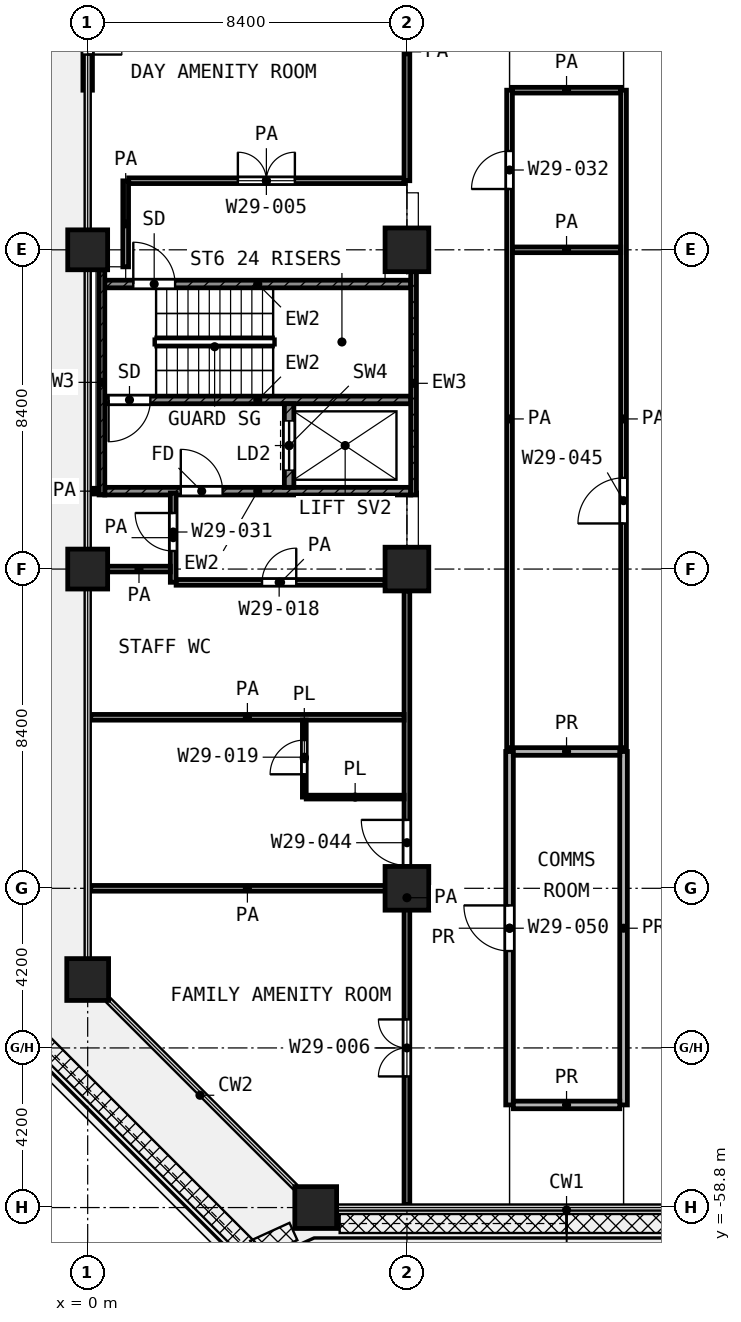
"""IFC4 building model, lengths in metres.
Left out: names, types, materials, properties, quantities, classifications, styles, units other than length and angle.
Written with IfcOpenShell. Run it as: python <this file> out.ifc"""

import sys

from ifc_helpers import new_model, si_unit, direction, frame, frame_2d, origin, origin_2d, place, context, subcontext, project, spatial, rectangle, extrude, element, fill, save


model = new_model("IFC4")
c1 = context("Model", 3, precision=1e-05, world=origin(), true_north=direction((0.0, 1.0)))
c2 = subcontext(c1, "Body", "Model", "MODEL_VIEW")
j1 = project(units=[si_unit("LENGTHUNIT", "METRE"), si_unit("PLANEANGLEUNIT", "RADIAN")], contexts=[c1])
p1 = place(None, origin())
s1 = spatial("IfcSite", under=j1, at=p1, CompositionType="ELEMENT")
p2 = place(p1, origin())
s2 = spatial("IfcBuilding", under=s1, at=p2, CompositionType="ELEMENT")
p3 = place(p2, frame((0.0, 0.0, 149.2)))
s3 = spatial("IfcBuildingStorey", under=s2, at=p3, CompositionType="ELEMENT", Elevation=149.2)
p4 = place(p3, frame((0.0, -33.6, 0.0), z_axis=(0.0, 0.0, 1.0), x_axis=(1.0, 0.0, 0.0)))
e1 = element("IfcColumn", 1, at=p4, inside=s3, PredefinedType="COLUMN", context=c2, shape_type="SweptSolid", body=[
    extrude(rectangle(XDim=1.05, YDim=1.05, at=origin_2d()), origin(), (0.0, 0.0, 1.0), 4.2),
])
p5 = place(p3, frame((8.4, -33.6, 0.0), z_axis=(0.0, 0.0, 1.0), x_axis=(1.0, 0.0, 0.0)))
e2 = element("IfcColumn", 2, at=p5, inside=s3, PredefinedType="COLUMN", context=c2, shape_type="SweptSolid", body=[
    extrude(rectangle(XDim=1.15, YDim=1.15, at=origin_2d()), origin(), (0.0, 0.0, 1.0), 4.2),
])
p6 = place(p3, frame((0.0, -42.0, 0.0), z_axis=(0.0, 0.0, 1.0), x_axis=(1.0, 0.0, 0.0)))
e3 = element("IfcColumn", 3, at=p6, inside=s3, PredefinedType="COLUMN", context=c2, shape_type="SweptSolid", body=[
    extrude(rectangle(XDim=1.05, YDim=1.05, at=origin_2d()), origin(), (0.0, 0.0, 1.0), 4.2),
])
for number, where, z_axis, x_axis in (
    (4, (8.4, -42.0, 0.0), (0.0, 0.0, 1.0), (1.0, 0.0, 0.0)),
    (5, (8.4, -50.4, 0.0), (0.0, 0.0, 1.0), (1.0, 0.0, 0.0)),
):
    element("IfcColumn", number, at=place(p3, frame(where, z_axis=z_axis, x_axis=x_axis)), inside=s3, PredefinedType="COLUMN", context=c2, shape_type="SweptSolid", body=[
        extrude(rectangle(XDim=1.15, YDim=1.15, at=origin_2d()), origin(), (0.0, 0.0, 1.0), 4.2),
    ])
for number, where, z_axis, x_axis in (
    (6, (0.0, -52.8, 0.0), (0.0, 0.0, 1.0), (1.0, 0.0, 0.0)),
    (7, (6.0, -58.8, 0.0), (0.0, 0.0, 1.0), (1.0, 0.0, 0.0)),
):
    element("IfcColumn", number, at=place(p3, frame(where, z_axis=z_axis, x_axis=x_axis)), inside=s3, PredefinedType="COLUMN", context=c2, shape_type="SweptSolid", body=[
        extrude(rectangle(XDim=1.1, YDim=1.1, at=origin_2d()), origin(), (0.0, 0.0, 1.0), 4.2),
    ])
p7 = place(p3, frame((0.0, -25.725, 0.0), z_axis=(0.0, 0.0, 1.0), x_axis=(0.0, -1.0, 0.0)))
e8 = element("IfcWall", 8, at=p7, inside=s3, PredefinedType="SOLIDWALL", context=c2, shape_type="SweptSolid", body=[
    extrude(rectangle(XDim=3.675, YDim=0.25, at=frame_2d((1.837, 0.0))), origin(), (0.0, 0.0, 1.0), 3.58),
])
p8 = place(p7, frame((0.938, 0.0, 0.0)))
e9 = element("IfcOpeningElement", 9, at=p8, cuts=e8, PredefinedType="OPENING", context=c2, shape_type="SweptSolid", body=[
    extrude(rectangle(XDim=1.8, YDim=2.1, at=frame_2d((0.9, 1.05))), frame((0.0, 0.135, 0.0), z_axis=(0.0, -1.0, 0.0), x_axis=(1.0, 0.0, 0.0)), (0.0, 0.0, 1.0), 0.27),
])
p9 = place(p3, frame((0.375, -40.05, 0.0), z_axis=(0.0, 0.0, 1.0), x_axis=(0.0, 1.0, 0.0)))
e10 = element("IfcWall", 10, at=p9, inside=s3, PredefinedType="SHEAR", context=c2, shape_type="SweptSolid", body=[
    extrude(rectangle(XDim=5.925, YDim=0.15, at=frame_2d((2.962, 0.0))), origin(), (0.0, 0.0, 1.0), 3.7),
])
p10 = place(p3, frame((8.575, -40.05, 0.0), z_axis=(0.0, 0.0, 1.0), x_axis=(0.0, 1.0, 0.0)))
e11 = element("IfcWall", 11, at=p10, inside=s3, PredefinedType="SHEAR", context=c2, shape_type="SweptSolid", body=[
    extrude(rectangle(XDim=5.875, YDim=0.15, at=frame_2d((2.938, 0.0))), origin(), (0.0, 0.0, 1.0), 3.7),
])
p11 = place(p3, frame((0.45, -34.5, 0.0), z_axis=(0.0, 0.0, 1.0), x_axis=(1.0, 0.0, 0.0)))
e12 = element("IfcWall", 12, at=p11, inside=s3, PredefinedType="SHEAR", context=c2, shape_type="SweptSolid", body=[
    extrude(rectangle(XDim=8.05, YDim=0.2, at=frame_2d((4.025, 0.0))), origin(), (0.0, 0.0, 1.0), 3.7),
])
p12 = place(p11, frame((0.75, 0.0, 0.0)))
e13 = element("IfcOpeningElement", 13, at=p12, cuts=e12, PredefinedType="OPENING", context=c2, shape_type="SweptSolid", body=[
    extrude(rectangle(XDim=1.1, YDim=2.1, at=frame_2d((0.55, 1.05))), frame((0.0, 0.11, 0.0), z_axis=(0.0, -1.0, 0.0), x_axis=(1.0, 0.0, 0.0)), (0.0, 0.0, 1.0), 0.22),
])
p13 = place(p3, frame((0.45, -37.55, 0.0), z_axis=(0.0, 0.0, 1.0), x_axis=(1.0, 0.0, 0.0)))
e14 = element("IfcWall", 14, at=p13, inside=s3, PredefinedType="SHEAR", context=c2, shape_type="SweptSolid", body=[
    extrude(rectangle(XDim=8.05, YDim=0.2, at=frame_2d((4.025, 0.0))), origin(), (0.0, 0.0, 1.0), 3.7),
])
p14 = place(p13, frame((0.1, 0.0, 0.0)))
e15 = element("IfcOpeningElement", 15, at=p14, cuts=e14, PredefinedType="OPENING", context=c2, shape_type="SweptSolid", body=[
    extrude(rectangle(XDim=1.1, YDim=2.1, at=frame_2d((0.55, 1.05))), frame((0.0, 0.11, 0.0), z_axis=(0.0, -1.0, 0.0), x_axis=(1.0, 0.0, 0.0)), (0.0, 0.0, 1.0), 0.22),
])
p15 = place(p3, frame((0.45, -39.95, 0.0), z_axis=(0.0, 0.0, 1.0), x_axis=(1.0, 0.0, 0.0)))
e16 = element("IfcWall", 16, at=p15, inside=s3, PredefinedType="SHEAR", context=c2, shape_type="SweptSolid", body=[
    extrude(rectangle(XDim=8.05, YDim=0.2, at=frame_2d((4.025, 0.0))), origin(), (0.0, 0.0, 1.0), 3.7),
])
p16 = place(p15, frame((2.0, 0.0, 0.0)))
e17 = element("IfcOpeningElement", 17, at=p16, cuts=e16, PredefinedType="OPENING", context=c2, shape_type="SweptSolid", body=[
    extrude(rectangle(XDim=1.1, YDim=2.1, at=frame_2d((0.55, 1.05))), frame((0.0, 0.11, 0.0), z_axis=(0.0, -1.0, 0.0), x_axis=(1.0, 0.0, 0.0)), (0.0, 0.0, 1.0), 0.22),
])
p17 = place(p3, frame((5.3, -39.85, 0.0), z_axis=(0.0, 0.0, 1.0), x_axis=(0.0, 1.0, 0.0)))
e18 = element("IfcWall", 18, at=p17, inside=s3, PredefinedType="SHEAR", context=c2, shape_type="SweptSolid", body=[
    extrude(rectangle(XDim=2.2, YDim=0.25, at=frame_2d((1.1, 0.0))), origin(), (0.0, 0.0, 1.0), 3.7),
])
p18 = place(p17, frame((0.45, 0.0, 0.0)))
e19 = element("IfcOpeningElement", 19, at=p18, cuts=e18, PredefinedType="OPENING", context=c2, shape_type="SweptSolid", body=[
    extrude(rectangle(XDim=1.3, YDim=2.1, at=frame_2d((0.65, 1.05))), frame((0.0, 0.135, 0.0), z_axis=(0.0, -1.0, 0.0), x_axis=(1.0, 0.0, 0.0)), (0.0, 0.0, 1.0), 0.27),
])
p19 = place(p3, frame((5.75, -48.0, 0.0), z_axis=(0.0, 0.0, 1.0), x_axis=(1.0, 0.0, 0.0)))
e20 = element("IfcWall", 20, at=p19, inside=s3, PredefinedType="PARTITIONING", context=c2, shape_type="SweptSolid", body=[
    extrude(rectangle(XDim=2.575, YDim=0.1, at=frame_2d((1.288, 0.0))), origin(), (0.0, 0.0, 1.0), 3.7),
])
p20 = place(p3, frame((5.7, -48.0, 0.0), z_axis=(0.0, 0.0, 1.0), x_axis=(0.0, 1.0, 0.0)))
e21 = element("IfcWall", 21, at=p20, inside=s3, PredefinedType="PARTITIONING", context=c2, shape_type="SweptSolid", body=[
    extrude(rectangle(XDim=2.025, YDim=0.1, at=frame_2d((1.012, 0.0))), origin(), (0.0, 0.0, 1.0), 3.7),
])
p21 = place(p20, frame((0.6, 0.0, 0.0)))
e22 = element("IfcOpeningElement", 22, at=p21, cuts=e21, PredefinedType="OPENING", context=c2, shape_type="SweptSolid", body=[
    extrude(rectangle(XDim=0.9, YDim=2.1, at=frame_2d((0.45, 1.05))), frame((0.0, 0.06, 0.0), z_axis=(0.0, -1.0, 0.0), x_axis=(1.0, 0.0, 0.0)), (0.0, 0.0, 1.0), 0.12),
])
for number, where, z_axis, x_axis in (
    (23, (0.08, -50.4, 0.0), (0.0, 0.0, 1.0), (1.0, 0.0, 0.0)),
    (24, (0.08, -45.9, 0.0), (0.0, 0.0, 1.0), (1.0, 0.0, 0.0)),
):
    element("IfcWall", number, at=place(p3, frame(where, z_axis=z_axis, x_axis=x_axis)), inside=s3, PredefinedType="PARTITIONING", context=c2, shape_type="SweptSolid", body=[
        extrude(rectangle(XDim=8.245, YDim=0.15, at=frame_2d((4.123, 0.0))), origin(), (0.0, 0.0, 1.0), 3.7),
    ])
p22 = place(p3, frame((2.327, -42.35, 0.0), z_axis=(0.0, 0.0, 1.0), x_axis=(1.0, 0.0, 0.0)))
e25 = element("IfcWall", 25, at=p22, inside=s3, PredefinedType="PARTITIONING", context=c2, shape_type="SweptSolid", body=[
    extrude(rectangle(XDim=5.498, YDim=0.15, at=frame_2d((2.749, 0.0))), origin(), (0.0, 0.0, 1.0), 3.7),
])
p23 = place(p22, frame((2.261, 0.0, 0.0)))
e26 = element("IfcOpeningElement", 26, at=p23, cuts=e25, PredefinedType="OPENING", context=c2, shape_type="SweptSolid", body=[
    extrude(rectangle(XDim=0.9, YDim=2.1, at=frame_2d((0.45, 1.05))), frame((0.0, 0.085, 0.0), z_axis=(0.0, -1.0, 0.0), x_axis=(1.0, 0.0, 0.0)), (0.0, 0.0, 1.0), 0.17),
])
p24 = place(p3, frame((0.525, -42.0, 0.0), z_axis=(0.0, 0.0, 1.0), x_axis=(1.0, 0.0, 0.0)))
e27 = element("IfcWall", 27, at=p24, inside=s3, PredefinedType="PARTITIONING", context=c2, shape_type="SweptSolid", body=[
    extrude(rectangle(XDim=1.65, YDim=0.15, at=frame_2d((0.825, 0.0))), origin(), (0.0, 0.0, 1.0), 3.7),
])
p25 = place(p3, frame((0.08, -39.95, 0.0), z_axis=(0.0, 0.0, 1.0), x_axis=(1.0, 0.0, 0.0)))
e28 = element("IfcWall", 28, at=p25, inside=s3, PredefinedType="PARTITIONING", context=c2, shape_type="SweptSolid", body=[
    extrude(rectangle(XDim=0.19, YDim=0.15, at=frame_2d((0.095, 0.0))), origin(), (0.0, 0.0, 1.0), 3.7),
])
p26 = place(p3, frame((11.175, -33.6, 0.0), z_axis=(0.0, 0.0, 1.0), x_axis=(1.0, 0.0, 0.0)))
e29 = element("IfcWall", 29, at=p26, inside=s3, PredefinedType="PARTITIONING", context=c2, shape_type="SweptSolid", body=[
    extrude(rectangle(XDim=2.85, YDim=0.15, at=frame_2d((1.425, 0.0))), origin(), (0.0, 0.0, 1.0), 3.7),
])
p27 = place(p3, frame((1.079, -31.782, 0.0), z_axis=(0.0, 0.0, 1.0), x_axis=(1.0, 0.0, 0.0)))
e30 = element("IfcWall", 30, at=p27, inside=s3, PredefinedType="PARTITIONING", context=c2, shape_type="SweptSolid", body=[
    extrude(rectangle(XDim=7.246, YDim=0.15, at=frame_2d((3.623, 0.0))), origin(), (0.0, 0.0, 1.0), 3.7),
])
p28 = place(p27, frame((2.873, 0.0, 0.0)))
e31 = element("IfcOpeningElement", 31, at=p28, cuts=e30, PredefinedType="OPENING", context=c2, shape_type="SweptSolid", body=[
    extrude(rectangle(XDim=1.5, YDim=2.1, at=frame_2d((0.75, 1.05))), frame((0.0, 0.085, 0.0), z_axis=(0.0, -1.0, 0.0), x_axis=(1.0, 0.0, 0.0)), (0.0, 0.0, 1.0), 0.17),
])
p29 = place(p3, frame((11.175, -29.4, 0.0), z_axis=(0.0, 0.0, 1.0), x_axis=(1.0, 0.0, 0.0)))
e32 = element("IfcWall", 32, at=p29, inside=s3, PredefinedType="PARTITIONING", context=c2, shape_type="SweptSolid", body=[
    extrude(rectangle(XDim=2.85, YDim=0.15, at=frame_2d((1.425, 0.0))), origin(), (0.0, 0.0, 1.0), 3.7),
])
p30 = place(p3, frame((1.0, -34.048, 0.0), z_axis=(0.0, 0.0, 1.0), x_axis=(0.0, 1.0, 0.0)))
e33 = element("IfcWall", 33, at=p30, inside=s3, PredefinedType="PARTITIONING", context=c2, shape_type="SweptSolid", body=[
    extrude(rectangle(XDim=2.263, YDim=0.15, at=frame_2d((1.132, 0.0))), origin(), (0.0, 0.0, 1.0), 3.7),
])
p31 = place(p3, frame((2.25, -42.348, 0.0), z_axis=(0.0, 0.0, 1.0), x_axis=(0.0, 1.0, 0.0)))
e34 = element("IfcWall", 34, at=p31, inside=s3, PredefinedType="PARTITIONING", context=c2, shape_type="SweptSolid", body=[
    extrude(rectangle(XDim=2.348, YDim=0.15, at=frame_2d((1.174, 0.0))), origin(), (0.0, 0.0, 1.0), 3.7),
])
p32 = place(p31, frame((0.823, 0.0, 0.0)))
e35 = element("IfcOpeningElement", 35, at=p32, cuts=e34, PredefinedType="OPENING", context=c2, shape_type="SweptSolid", body=[
    extrude(rectangle(XDim=1.0, YDim=2.1, at=frame_2d((0.5, 1.05))), frame((0.0, 0.085, 0.0), z_axis=(0.0, -1.0, 0.0), x_axis=(1.0, 0.0, 0.0)), (0.0, 0.0, 1.0), 0.17),
])
p33 = place(p3, frame((8.4, -58.72, 0.0), z_axis=(0.0, 0.0, 1.0), x_axis=(0.0, 1.0, 0.0)))
e36 = element("IfcWall", 36, at=p33, inside=s3, PredefinedType="PARTITIONING", context=c2, shape_type="SweptSolid", body=[
    extrude(rectangle(XDim=16.145, YDim=0.15, at=frame_2d((8.073, 0.0))), origin(), (0.0, 0.0, 1.0), 3.7),
])
p34 = place(p33, frame((8.92, 0.0, 0.0)))
e37 = element("IfcOpeningElement", 37, at=p34, cuts=e36, PredefinedType="OPENING", context=c2, shape_type="SweptSolid", body=[
    extrude(rectangle(XDim=1.2, YDim=2.1, at=frame_2d((0.6, 1.05))), frame((0.0, 0.085, 0.0), z_axis=(0.0, -1.0, 0.0), x_axis=(1.0, 0.0, 0.0)), (0.0, 0.0, 1.0), 0.17),
])
p35 = place(p33, frame((3.37, 0.0, 0.0)))
e38 = element("IfcOpeningElement", 38, at=p35, cuts=e36, PredefinedType="OPENING", context=c2, shape_type="SweptSolid", body=[
    extrude(rectangle(XDim=1.5, YDim=2.1, at=frame_2d((0.75, 1.05))), frame((0.0, 0.085, 0.0), z_axis=(0.0, -1.0, 0.0), x_axis=(1.0, 0.0, 0.0)), (0.0, 0.0, 1.0), 0.17),
])
p36 = place(p3, frame((8.4, -31.782, 0.0), z_axis=(0.0, 0.0, 1.0), x_axis=(0.0, 1.0, 0.0)))
e39 = element("IfcWall", 39, at=p36, inside=s3, PredefinedType="PARTITIONING", context=c2, shape_type="SweptSolid", body=[
    extrude(rectangle(XDim=6.782, YDim=0.15, at=frame_2d((3.391, 0.0))), origin(), (0.0, 0.0, 1.0), 3.7),
])
p37 = place(p3, frame((11.1, -46.7, 0.0), z_axis=(0.0, 0.0, 1.0), x_axis=(0.0, 1.0, 0.0)))
e40 = element("IfcWall", 40, at=p37, inside=s3, PredefinedType="PARTITIONING", context=c2, shape_type="SweptSolid", body=[
    extrude(rectangle(XDim=17.3, YDim=0.15, at=frame_2d((8.65, 0.0))), origin(), (0.0, 0.0, 1.0), 3.7),
])
p38 = place(p37, frame((14.7, 0.0, 0.0)))
e41 = element("IfcOpeningElement", 41, at=p38, cuts=e40, PredefinedType="OPENING", context=c2, shape_type="SweptSolid", body=[
    extrude(rectangle(XDim=1.0, YDim=2.1, at=frame_2d((0.5, 1.05))), frame((0.0, 0.085, 0.0), z_axis=(0.0, -1.0, 0.0), x_axis=(1.0, 0.0, 0.0)), (0.0, 0.0, 1.0), 0.17),
])
p39 = place(p3, frame((14.1, -46.7, 0.0), z_axis=(0.0, 0.0, 1.0), x_axis=(0.0, 1.0, 0.0)))
e42 = element("IfcWall", 42, at=p39, inside=s3, PredefinedType="PARTITIONING", context=c2, shape_type="SweptSolid", body=[
    extrude(rectangle(XDim=17.3, YDim=0.15, at=frame_2d((8.65, 0.0))), origin(), (0.0, 0.0, 1.0), 3.7),
])
p40 = place(p39, frame((5.9, 0.0, 0.0)))
e43 = element("IfcOpeningElement", 43, at=p40, cuts=e42, PredefinedType="OPENING", context=c2, shape_type="SweptSolid", body=[
    extrude(rectangle(XDim=1.2, YDim=2.1, at=frame_2d((0.6, 1.05))), frame((0.0, 0.085, 0.0), z_axis=(0.0, -1.0, 0.0), x_axis=(1.0, 0.0, 0.0)), (0.0, 0.0, 1.0), 0.17),
])
for number, where, z_axis, x_axis in (
    (44, (11.2, -56.1, 0.0), (0.0, 0.0, 1.0), (1.0, 0.0, 0.0)),
    (45, (11.2, -46.8, 0.0), (0.0, 0.0, 1.0), (1.0, 0.0, 0.0)),
):
    element("IfcWall", number, at=place(p3, frame(where, z_axis=z_axis, x_axis=x_axis)), inside=s3, PredefinedType="PARTITIONING", context=c2, shape_type="SweptSolid", body=[
        extrude(rectangle(XDim=2.8, YDim=0.2, at=frame_2d((1.4, 0.0))), origin(), (0.0, 0.0, 1.0), 3.7),
    ])
p41 = place(p3, frame((11.1, -56.1, 0.0), z_axis=(0.0, 0.0, 1.0), x_axis=(0.0, 1.0, 0.0)))
e46 = element("IfcWall", 46, at=p41, inside=s3, PredefinedType="PARTITIONING", context=c2, shape_type="SweptSolid", body=[
    extrude(rectangle(XDim=9.3, YDim=0.2, at=frame_2d((4.65, 0.0))), origin(), (0.0, 0.0, 1.0), 3.7),
])
p42 = place(p41, frame((4.05, 0.0, 0.0)))
e47 = element("IfcOpeningElement", 47, at=p42, cuts=e46, PredefinedType="OPENING", context=c2, shape_type="SweptSolid", body=[
    extrude(rectangle(XDim=1.2, YDim=2.1, at=frame_2d((0.6, 1.05))), frame((0.0, 0.11, 0.0), z_axis=(0.0, -1.0, 0.0), x_axis=(1.0, 0.0, 0.0)), (0.0, 0.0, 1.0), 0.22),
])
p43 = place(p3, frame((14.1, -56.1, 0.0), z_axis=(0.0, 0.0, 1.0), x_axis=(0.0, 1.0, 0.0)))
e48 = element("IfcWall", 48, at=p43, inside=s3, PredefinedType="PARTITIONING", context=c2, shape_type="SweptSolid", body=[
    extrude(rectangle(XDim=9.3, YDim=0.2, at=frame_2d((4.65, 0.0))), origin(), (0.0, 0.0, 1.0), 3.7),
])
p44 = place(p8, origin())
e49 = element("IfcDoor", 49, at=p44, inside=s3, OperationType="DOUBLE_DOOR_SINGLE_SWING", PredefinedType="DOOR", context=c2, shape_type="SweptSolid", body=[
    extrude(rectangle(XDim=1.8, YDim=2.1, at=frame_2d((0.9, 1.05))), frame((0.0, 0.025, 0.0), z_axis=(0.0, -1.0, 0.0), x_axis=(1.0, 0.0, 0.0)), (0.0, 0.0, 1.0), 0.05),
])
fill(e9, e49)
p45 = place(p12, origin())
e50 = element("IfcDoor", 50, at=p45, inside=s3, OperationType="SINGLE_SWING_LEFT", PredefinedType="DOOR", context=c2, shape_type="SweptSolid", body=[
    extrude(rectangle(XDim=1.1, YDim=2.1, at=frame_2d((0.55, 1.05))), frame((0.0, 0.025, 0.0), z_axis=(0.0, -1.0, 0.0), x_axis=(1.0, 0.0, 0.0)), (0.0, 0.0, 1.0), 0.05),
])
fill(e13, e50)
p46 = place(p14, frame((1.1, 0.0, 0.0), z_axis=(0.0, 0.0, 1.0), x_axis=(-1.0, 0.0, 0.0)))
e51 = element("IfcDoor", 51, at=p46, inside=s3, OperationType="SINGLE_SWING_LEFT", PredefinedType="DOOR", context=c2, shape_type="SweptSolid", body=[
    extrude(rectangle(XDim=1.1, YDim=2.1, at=frame_2d((0.55, 1.05))), frame((0.0, 0.025, 0.0), z_axis=(0.0, -1.0, 0.0), x_axis=(1.0, 0.0, 0.0)), (0.0, 0.0, 1.0), 0.05),
])
fill(e15, e51)
p47 = place(p18, origin())
e52 = element("IfcDoor", 52, at=p47, inside=s3, OperationType="DOUBLE_DOOR_SLIDING", PredefinedType="DOOR", context=c2, shape_type="SweptSolid", body=[
    extrude(rectangle(XDim=1.3, YDim=2.1, at=frame_2d((0.65, 1.05))), frame((0.0, 0.025, 0.0), z_axis=(0.0, -1.0, 0.0), x_axis=(1.0, 0.0, 0.0)), (0.0, 0.0, 1.0), 0.05),
])
fill(e19, e52)
p48 = place(p16, origin())
e53 = element("IfcDoor", 53, at=p48, inside=s3, OperationType="SINGLE_SWING_LEFT", PredefinedType="DOOR", context=c2, shape_type="SweptSolid", body=[
    extrude(rectangle(XDim=1.1, YDim=2.1, at=frame_2d((0.55, 1.05))), frame((0.0, 0.025, 0.0), z_axis=(0.0, -1.0, 0.0), x_axis=(1.0, 0.0, 0.0)), (0.0, 0.0, 1.0), 0.05),
])
fill(e17, e53)
p49 = place(p28, origin())
e54 = element("IfcDoor", 54, at=p49, inside=s3, OperationType="DOUBLE_DOOR_SINGLE_SWING", PredefinedType="DOOR", context=c2, shape_type="SweptSolid", body=[
    extrude(rectangle(XDim=1.5, YDim=2.1, at=frame_2d((0.75, 1.05))), frame((0.0, 0.025, 0.0), z_axis=(0.0, -1.0, 0.0), x_axis=(1.0, 0.0, 0.0)), (0.0, 0.0, 1.0), 0.05),
])
fill(e31, e54)
p50 = place(p32, origin())
e55 = element("IfcDoor", 55, at=p50, inside=s3, OperationType="SINGLE_SWING_RIGHT", PredefinedType="DOOR", context=c2, shape_type="SweptSolid", body=[
    extrude(rectangle(XDim=1.0, YDim=2.1, at=frame_2d((0.5, 1.05))), frame((0.0, 0.025, 0.0), z_axis=(0.0, -1.0, 0.0), x_axis=(1.0, 0.0, 0.0)), (0.0, 0.0, 1.0), 0.05),
])
fill(e35, e55)
p51 = place(p23, origin())
e56 = element("IfcDoor", 56, at=p51, inside=s3, OperationType="SINGLE_SWING_RIGHT", PredefinedType="DOOR", context=c2, shape_type="SweptSolid", body=[
    extrude(rectangle(XDim=0.9, YDim=2.1, at=frame_2d((0.45, 1.05))), frame((0.0, 0.025, 0.0), z_axis=(0.0, -1.0, 0.0), x_axis=(1.0, 0.0, 0.0)), (0.0, 0.0, 1.0), 0.05),
])
fill(e26, e56)
p52 = place(p34, origin())
e57 = element("IfcDoor", 57, at=p52, inside=s3, OperationType="SINGLE_SWING_RIGHT", PredefinedType="DOOR", context=c2, shape_type="SweptSolid", body=[
    extrude(rectangle(XDim=1.2, YDim=2.1, at=frame_2d((0.6, 1.05))), frame((0.0, 0.025, 0.0), z_axis=(0.0, -1.0, 0.0), x_axis=(1.0, 0.0, 0.0)), (0.0, 0.0, 1.0), 0.05),
])
fill(e37, e57)
p53 = place(p21, origin())
e58 = element("IfcDoor", 58, at=p53, inside=s3, OperationType="SINGLE_SWING_LEFT", PredefinedType="DOOR", context=c2, shape_type="SweptSolid", body=[
    extrude(rectangle(XDim=0.9, YDim=2.1, at=frame_2d((0.45, 1.05))), frame((0.0, 0.025, 0.0), z_axis=(0.0, -1.0, 0.0), x_axis=(1.0, 0.0, 0.0)), (0.0, 0.0, 1.0), 0.05),
])
fill(e22, e58)
p54 = place(p35, origin())
e59 = element("IfcDoor", 59, at=p54, inside=s3, OperationType="DOUBLE_DOOR_SINGLE_SWING", PredefinedType="DOOR", context=c2, shape_type="SweptSolid", body=[
    extrude(rectangle(XDim=1.5, YDim=2.1, at=frame_2d((0.75, 1.05))), frame((0.0, 0.025, 0.0), z_axis=(0.0, -1.0, 0.0), x_axis=(1.0, 0.0, 0.0)), (0.0, 0.0, 1.0), 0.05),
])
fill(e38, e59)
p55 = place(p38, origin())
e60 = element("IfcDoor", 60, at=p55, inside=s3, OperationType="SINGLE_SWING_LEFT", PredefinedType="DOOR", context=c2, shape_type="SweptSolid", body=[
    extrude(rectangle(XDim=1.0, YDim=2.1, at=frame_2d((0.5, 1.05))), frame((0.0, 0.025, 0.0), z_axis=(0.0, -1.0, 0.0), x_axis=(1.0, 0.0, 0.0)), (0.0, 0.0, 1.0), 0.05),
])
fill(e41, e60)
p56 = place(p40, origin())
e61 = element("IfcDoor", 61, at=p56, inside=s3, OperationType="SINGLE_SWING_LEFT", PredefinedType="DOOR", context=c2, shape_type="SweptSolid", body=[
    extrude(rectangle(XDim=1.2, YDim=2.1, at=frame_2d((0.6, 1.05))), frame((0.0, 0.025, 0.0), z_axis=(0.0, -1.0, 0.0), x_axis=(1.0, 0.0, 0.0)), (0.0, 0.0, 1.0), 0.05),
])
fill(e43, e61)
p57 = place(p42, origin())
e62 = element("IfcDoor", 62, at=p57, inside=s3, OperationType="SINGLE_SWING_RIGHT", PredefinedType="DOOR", context=c2, shape_type="SweptSolid", body=[
    extrude(rectangle(XDim=1.2, YDim=2.1, at=frame_2d((0.6, 1.05))), frame((0.0, 0.025, 0.0), z_axis=(0.0, -1.0, 0.0), x_axis=(1.0, 0.0, 0.0)), (0.0, 0.0, 1.0), 0.05),
])
fill(e47, e62)
save(model, sys.argv[1])
